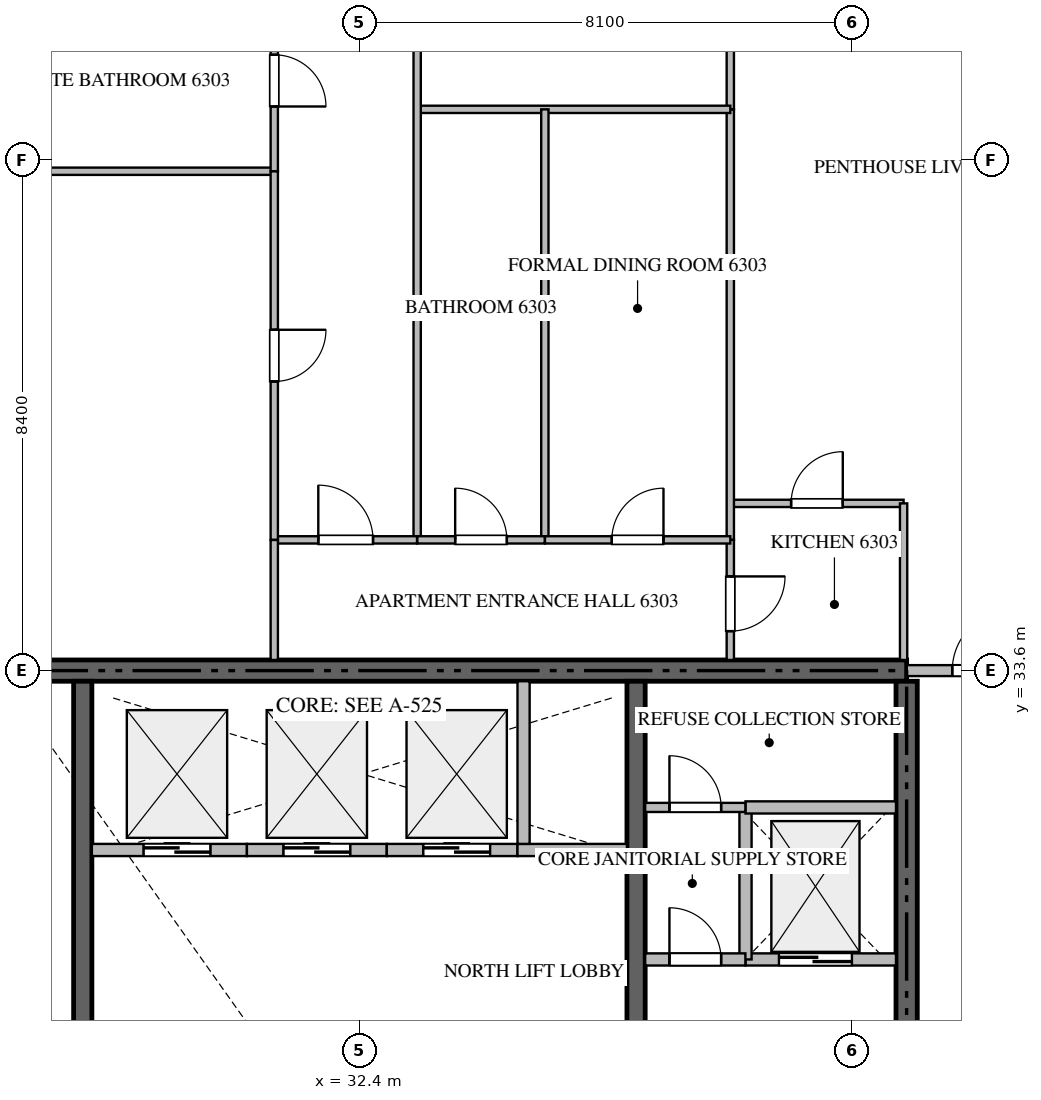
"""IFC4 building model, lengths in metres.
Left out: names, types, materials, properties, quantities, classifications, styles, units other than length and angle.
Written with IfcOpenShell. Run it as: python <this file> out.ifc"""

import sys

from ifc_helpers import new_model, si_unit, direction, frame, frame_2d, origin, place, context, subcontext, project, spatial, rectangle, extrude, source, transform, mapped, element, fill, save


model = new_model("IFC4")
c1 = context("Model", 3, precision=1e-05, world=origin(), true_north=direction((0.0, 1.0)))
c2 = subcontext(c1, "Body", "Model", "MODEL_VIEW")
j1 = project(units=[si_unit("LENGTHUNIT", "METRE"), si_unit("PLANEANGLEUNIT", "RADIAN")], contexts=[c1])
p1 = place(None, origin())
s1 = spatial("IfcSite", under=j1, at=p1, CompositionType="ELEMENT")
p2 = place(p1, origin())
s2 = spatial("IfcBuilding", under=s1, at=p2, CompositionType="ELEMENT")
p3 = place(p2, frame((0.0, 0.0, 252.8)))
s3 = spatial("IfcBuildingStorey", under=s2, at=p3, CompositionType="ELEMENT", Elevation=252.8)
p4 = place(p3, frame((41.4, 33.6, -0.26), z_axis=(0.0, 0.0, 1.0), x_axis=(-1.0, 0.0, 0.0)))
e1 = element("IfcWall", 1, at=p4, inside=s3, PredefinedType="SHEAR", context=c2, shape_type="SweptSolid", body=[
    extrude(rectangle(XDim=18.0, YDim=0.35, at=frame_2d((9.0, 0.0))), origin(), (0.0, 0.0, 1.0), 3.848),
])
p5 = place(p3, frame((41.4, 27.75, -0.26), z_axis=(0.0, 0.0, 1.0), x_axis=(0.0, 1.0, 0.0)))
e2 = element("IfcWall", 2, at=p5, inside=s3, PredefinedType="SHEAR", context=c2, shape_type="SweptSolid", body=[
    extrude(rectangle(XDim=5.675, YDim=0.35, at=frame_2d((2.837, 0.0))), origin(), (0.0, 0.0, 1.0), 3.848),
])
p6 = place(p3, frame((27.85, 23.55, -0.26), z_axis=(0.0, 0.0, 1.0), x_axis=(0.0, 1.0, 0.0)))
e3 = element("IfcWall", 3, at=p6, inside=s3, PredefinedType="SHEAR", context=c2, shape_type="SweptSolid", body=[
    extrude(rectangle(XDim=9.875, YDim=0.3, at=frame_2d((4.938, 0.0))), origin(), (0.0, 0.0, 1.0), 3.848),
])
p7 = place(p3, frame((36.95, 27.05, -0.26), z_axis=(0.0, 0.0, 1.0), x_axis=(0.0, 1.0, 0.0)))
e4 = element("IfcWall", 4, at=p7, inside=s3, PredefinedType="SHEAR", context=c2, shape_type="SweptSolid", body=[
    extrude(rectangle(XDim=6.375, YDim=0.3, at=frame_2d((3.188, 0.0))), origin(), (0.0, 0.0, 1.0), 3.848),
])
p8 = place(p3, frame((38.75, 28.85, 0.0), z_axis=(0.0, 0.0, 1.0), x_axis=(1.0, 0.0, 0.0)))
e5 = element("IfcWall", 5, at=p8, inside=s3, PredefinedType="STANDARD", context=c2, shape_type="SweptSolid", body=[
    extrude(rectangle(XDim=2.475, YDim=0.2, at=frame_2d((1.238, 0.0))), origin(), (0.0, 0.0, 1.0), 3.59),
])
p9 = place(p8, frame((0.55, 0.0, 0.0)))
e6 = element("IfcOpeningElement", 6, at=p9, cuts=e5, PredefinedType="OPENING", context=c2, shape_type="SweptSolid", body=[
    extrude(rectangle(XDim=1.2, YDim=2.2, at=frame_2d((0.6, 1.1))), frame((0.0, 0.11, 0.0), z_axis=(0.0, -1.0, 0.0), x_axis=(1.0, 0.0, 0.0)), (0.0, 0.0, 1.0), 0.22),
])
p10 = place(p3, frame((28.0, 30.65, 0.0), z_axis=(0.0, 0.0, 1.0), x_axis=(1.0, 0.0, 0.0)))
e7 = element("IfcWall", 7, at=p10, inside=s3, PredefinedType="STANDARD", context=c2, shape_type="SweptSolid", body=[
    extrude(rectangle(XDim=2.55, YDim=0.2, at=frame_2d((1.275, 0.0))), origin(), (0.0, 0.0, 1.0), 3.59),
])
p11 = place(p10, frame((0.85, 0.0, 0.0)))
e8 = element("IfcOpeningElement", 8, at=p11, cuts=e7, PredefinedType="OPENING", context=c2, shape_type="SweptSolid", body=[
    extrude(rectangle(XDim=1.1, YDim=2.2, at=frame_2d((0.55, 1.1))), frame((0.0, 0.11, 0.0), z_axis=(0.0, -1.0, 0.0), x_axis=(1.0, 0.0, 0.0)), (0.0, 0.0, 1.0), 0.22),
])
p12 = place(p3, frame((30.55, 30.65, 0.0), z_axis=(0.0, 0.0, 1.0), x_axis=(1.0, 0.0, 0.0)))
e9 = element("IfcWall", 9, at=p12, inside=s3, PredefinedType="STANDARD", context=c2, shape_type="SweptSolid", body=[
    extrude(rectangle(XDim=2.3, YDim=0.2, at=frame_2d((1.15, 0.0))), origin(), (0.0, 0.0, 1.0), 3.59),
])
p13 = place(p12, frame((0.6, 0.0, 0.0)))
e10 = element("IfcOpeningElement", 10, at=p13, cuts=e9, PredefinedType="OPENING", context=c2, shape_type="SweptSolid", body=[
    extrude(rectangle(XDim=1.1, YDim=2.2, at=frame_2d((0.55, 1.1))), frame((0.0, 0.11, 0.0), z_axis=(0.0, -1.0, 0.0), x_axis=(1.0, 0.0, 0.0)), (0.0, 0.0, 1.0), 0.22),
])
p14 = place(p3, frame((32.85, 30.65, 0.0), z_axis=(0.0, 0.0, 1.0), x_axis=(1.0, 0.0, 0.0)))
e11 = element("IfcWall", 11, at=p14, inside=s3, PredefinedType="STANDARD", context=c2, shape_type="SweptSolid", body=[
    extrude(rectangle(XDim=2.15, YDim=0.2, at=frame_2d((1.075, 0.0))), origin(), (0.0, 0.0, 1.0), 3.59),
])
p15 = place(p14, frame((0.6, 0.0, 0.0)))
e12 = element("IfcOpeningElement", 12, at=p15, cuts=e11, PredefinedType="OPENING", context=c2, shape_type="SweptSolid", body=[
    extrude(rectangle(XDim=1.1, YDim=2.2, at=frame_2d((0.55, 1.1))), frame((0.0, 0.11, 0.0), z_axis=(0.0, -1.0, 0.0), x_axis=(1.0, 0.0, 0.0)), (0.0, 0.0, 1.0), 0.22),
])
p16 = place(p3, frame((35.0, 30.65, 0.0), z_axis=(0.0, 0.0, 1.0), x_axis=(1.0, 0.0, 0.0)))
e13 = element("IfcWall", 13, at=p16, inside=s3, PredefinedType="STANDARD", context=c2, shape_type="SweptSolid", body=[
    extrude(rectangle(XDim=1.8, YDim=0.2, at=frame_2d((0.9, 0.0))), origin(), (0.0, 0.0, 1.0), 3.59),
])
p17 = place(p3, frame((35.1, 30.75, 0.0), z_axis=(0.0, 0.0, 1.0), x_axis=(0.0, 1.0, 0.0)))
e14 = element("IfcWall", 14, at=p17, inside=s3, PredefinedType="STANDARD", context=c2, shape_type="SweptSolid", body=[
    extrude(rectangle(XDim=2.675, YDim=0.2, at=frame_2d((1.337, 0.0))), origin(), (0.0, 0.0, 1.0), 3.59),
])
p18 = place(p3, frame((38.75, 28.85, 0.0), z_axis=(0.0, 0.0, 1.0), x_axis=(0.0, 1.0, 0.0)))
e15 = element("IfcWall", 15, at=p18, inside=s3, PredefinedType="STANDARD", context=c2, shape_type="SweptSolid", body=[
    extrude(rectangle(XDim=2.5, YDim=0.2, at=frame_2d((1.25, 0.0))), origin(), (0.0, 0.0, 1.0), 3.59),
])
p19 = place(p3, frame((38.75, 31.35, 0.0), z_axis=(0.0, 0.0, 1.0), x_axis=(1.0, 0.0, 0.0)))
e16 = element("IfcWall", 16, at=p19, inside=s3, PredefinedType="STANDARD", context=c2, shape_type="SweptSolid", body=[
    extrude(rectangle(XDim=2.475, YDim=0.2, at=frame_2d((1.238, 0.0))), origin(), (0.0, 0.0, 1.0), 3.59),
])
p20 = place(p3, frame((37.1, 28.85, 0.0), z_axis=(0.0, 0.0, 1.0), x_axis=(1.0, 0.0, 0.0)))
e17 = element("IfcWall", 17, at=p20, inside=s3, PredefinedType="STANDARD", context=c2, shape_type="SweptSolid", body=[
    extrude(rectangle(XDim=1.648, YDim=0.2, at=frame_2d((0.824, 0.0))), origin(), (0.0, 0.0, 1.0), 3.59),
])
p21 = place(p20, frame((0.399, 0.0, 0.0)))
e18 = element("IfcOpeningElement", 18, at=p21, cuts=e17, PredefinedType="OPENING", context=c2, shape_type="SweptSolid", body=[
    extrude(rectangle(XDim=0.85, YDim=2.1, at=frame_2d((0.425, 1.05))), frame((0.0, 0.11, 0.0), z_axis=(0.0, -1.0, 0.0), x_axis=(1.0, 0.0, 0.0)), (0.0, 0.0, 1.0), 0.22),
])
p22 = place(p3, frame((37.1, 31.35, 0.0), z_axis=(0.0, 0.0, 1.0), x_axis=(1.0, 0.0, 0.0)))
e19 = element("IfcWall", 19, at=p22, inside=s3, PredefinedType="PARTITIONING", context=c2, shape_type="SweptSolid", body=[
    extrude(rectangle(XDim=1.648, YDim=0.15, at=frame_2d((0.824, 0.0))), origin(), (0.0, 0.0, 1.0), 3.59),
])
p23 = place(p22, frame((0.399, 0.0, 0.0)))
e20 = element("IfcOpeningElement", 20, at=p23, cuts=e19, PredefinedType="OPENING", context=c2, shape_type="SweptSolid", body=[
    extrude(rectangle(XDim=0.85, YDim=2.1, at=frame_2d((0.425, 1.05))), frame((0.0, 0.085, 0.0), z_axis=(0.0, -1.0, 0.0), x_axis=(1.0, 0.0, 0.0)), (0.0, 0.0, 1.0), 0.17),
])
p24 = place(p3, frame((41.402, 33.6, 0.0), z_axis=(0.0, 0.0, 1.0), x_axis=(1.0, 0.0, 0.0)))
e21 = element("IfcWall", 21, at=p24, inside=s3, PredefinedType="PARTITIONING", context=c2, shape_type="SweptSolid", body=[
    extrude(rectangle(XDim=2.496, YDim=0.18, at=frame_2d((1.248, 0.0))), origin(), (0.0, 0.0, 1.0), 3.59),
])
p25 = place(p24, frame((0.748, 0.0, 0.0)))
e22 = element("IfcOpeningElement", 22, at=p25, cuts=e21, PredefinedType="OPENING", context=c2, shape_type="SweptSolid", body=[
    extrude(rectangle(XDim=1.0, YDim=2.15, at=frame_2d((0.5, 1.075))), frame((0.0, 0.1, 0.0), z_axis=(0.0, -1.0, 0.0), x_axis=(1.0, 0.0, 0.0)), (0.0, 0.0, 1.0), 0.2),
])
p26 = place(p3, frame((38.5, 36.35, 0.0), z_axis=(0.0, 0.0, 1.0), x_axis=(1.0, 0.0, 0.0)))
e23 = element("IfcWall", 23, at=p26, inside=s3, PredefinedType="PARTITIONING", context=c2, shape_type="SweptSolid", body=[
    extrude(rectangle(XDim=2.85, YDim=0.12, at=frame_2d((1.425, 0.0))), origin(), (0.0, 0.0, 1.0), 3.59),
])
p27 = place(p26, frame((1.0, 0.0, 0.0)))
e24 = element("IfcOpeningElement", 24, at=p27, cuts=e23, PredefinedType="OPENING", context=c2, shape_type="SweptSolid", body=[
    extrude(rectangle(XDim=0.85, YDim=2.1, at=frame_2d((0.425, 1.05))), frame((0.0, 0.07, 0.0), z_axis=(0.0, -1.0, 0.0), x_axis=(1.0, 0.0, 0.0)), (0.0, 0.0, 1.0), 0.14),
])
p28 = place(p3, frame((41.35, 36.35, 0.0), z_axis=(0.0, 0.0, 1.0), x_axis=(0.0, -1.0, 0.0)))
e25 = element("IfcWall", 25, at=p28, inside=s3, PredefinedType="PARTITIONING", context=c2, shape_type="SweptSolid", body=[
    extrude(rectangle(XDim=2.575, YDim=0.12, at=frame_2d((1.288, 0.0))), origin(), (0.0, 0.0, 1.0), 3.59),
])
p29 = place(p3, frame((38.5, 35.75, 0.0), z_axis=(0.0, 0.0, 1.0), x_axis=(0.0, -1.0, 0.0)))
e26 = element("IfcWall", 26, at=p29, inside=s3, PredefinedType="PARTITIONING", context=c2, shape_type="SweptSolid", body=[
    extrude(rectangle(XDim=1.975, YDim=0.12, at=frame_2d((0.988, 0.0))), origin(), (0.0, 0.0, 1.0), 3.59),
])
p30 = place(p29, frame((0.601, 0.0, 0.0)))
e27 = element("IfcOpeningElement", 27, at=p30, cuts=e26, PredefinedType="OPENING", context=c2, shape_type="SweptSolid", body=[
    extrude(rectangle(XDim=0.9, YDim=2.1, at=frame_2d((0.45, 1.05))), frame((0.0, 0.07, 0.0), z_axis=(0.0, -1.0, 0.0), x_axis=(1.0, 0.0, 0.0)), (0.0, 0.0, 1.0), 0.14),
])
p31 = place(p3, frame((38.5, 49.105, 0.0), z_axis=(0.0, 0.0, 1.0), x_axis=(0.0, -1.0, 0.0)))
e28 = element("IfcWall", 28, at=p31, inside=s3, PredefinedType="PARTITIONING", context=c2, shape_type="SweptSolid", body=[
    extrude(rectangle(XDim=6.275, YDim=0.12, at=frame_2d((3.137, 0.0))), origin(), (0.0, 0.0, 1.0), 3.59),
])
p32 = place(p31, frame((2.956, 0.0, 0.0)))
e29 = element("IfcOpeningElement", 29, at=p32, cuts=e28, PredefinedType="OPENING", context=c2, shape_type="SweptSolid", body=[
    extrude(rectangle(XDim=0.9, YDim=2.1, at=frame_2d((0.45, 1.05))), frame((0.0, 0.07, 0.0), z_axis=(0.0, -1.0, 0.0), x_axis=(1.0, 0.0, 0.0)), (0.0, 0.0, 1.0), 0.14),
])
p33 = place(p3, frame((38.5, 42.828, 0.0), z_axis=(0.0, 0.0, 1.0), x_axis=(0.0, -1.0, 0.0)))
e30 = element("IfcWall", 30, at=p33, inside=s3, PredefinedType="PARTITIONING", context=c2, shape_type="SweptSolid", body=[
    extrude(rectangle(XDim=7.076, YDim=0.12, at=frame_2d((3.538, 0.0))), origin(), (0.0, 0.0, 1.0), 3.59),
])
p34 = place(p3, frame((33.35, 42.83, 0.0), z_axis=(0.0, 0.0, 1.0), x_axis=(1.0, 0.0, 0.0)))
e31 = element("IfcWall", 31, at=p34, inside=s3, PredefinedType="PARTITIONING", context=c2, shape_type="SweptSolid", body=[
    extrude(rectangle(XDim=5.15, YDim=0.12, at=frame_2d((2.575, 0.0))), origin(), (0.0, 0.0, 1.0), 3.59),
])
p35 = place(p3, frame((33.35, 49.105, 0.0), z_axis=(0.0, 0.0, 1.0), x_axis=(0.0, -1.0, 0.0)))
e32 = element("IfcWall", 32, at=p35, inside=s3, PredefinedType="PARTITIONING", context=c2, shape_type="SweptSolid", body=[
    extrude(rectangle(XDim=13.355, YDim=0.12, at=frame_2d((6.677, 0.0))), origin(), (0.0, 0.0, 1.0), 3.59),
])
p36 = place(p3, frame((35.45, 42.83, 0.0), z_axis=(0.0, 0.0, 1.0), x_axis=(0.0, -1.0, 0.0)))
e33 = element("IfcWall", 33, at=p36, inside=s3, PredefinedType="PARTITIONING", context=c2, shape_type="SweptSolid", body=[
    extrude(rectangle(XDim=7.08, YDim=0.12, at=frame_2d((3.54, 0.0))), origin(), (0.0, 0.0, 1.0), 3.59),
])
p37 = place(p3, frame((33.35, 35.75, 0.0), z_axis=(0.0, 0.0, 1.0), x_axis=(1.0, 0.0, 0.0)))
e34 = element("IfcWall", 34, at=p37, inside=s3, PredefinedType="PARTITIONING", context=c2, shape_type="SweptSolid", body=[
    extrude(rectangle(XDim=2.1, YDim=0.12, at=frame_2d((1.05, 0.0))), origin(), (0.0, 0.0, 1.0), 3.59),
])
p38 = place(p37, frame((0.625, 0.0, 0.0)))
e35 = element("IfcOpeningElement", 35, at=p38, cuts=e34, PredefinedType="OPENING", context=c2, shape_type="SweptSolid", body=[
    extrude(rectangle(XDim=0.85, YDim=2.1, at=frame_2d((0.425, 1.05))), frame((0.0, 0.07, 0.0), z_axis=(0.0, -1.0, 0.0), x_axis=(1.0, 0.0, 0.0)), (0.0, 0.0, 1.0), 0.14),
])
p39 = place(p3, frame((35.452, 35.75, 0.0), z_axis=(0.0, 0.0, 1.0), x_axis=(1.0, 0.0, 0.0)))
e36 = element("IfcWall", 36, at=p39, inside=s3, PredefinedType="PARTITIONING", context=c2, shape_type="SweptSolid", body=[
    extrude(rectangle(XDim=3.048, YDim=0.12, at=frame_2d((1.524, 0.0))), origin(), (0.0, 0.0, 1.0), 3.59),
])
p40 = place(p39, frame((1.099, 0.0, 0.0)))
e37 = element("IfcOpeningElement", 37, at=p40, cuts=e36, PredefinedType="OPENING", context=c2, shape_type="SweptSolid", body=[
    extrude(rectangle(XDim=0.85, YDim=2.1, at=frame_2d((0.425, 1.05))), frame((0.0, 0.07, 0.0), z_axis=(0.0, -1.0, 0.0), x_axis=(1.0, 0.0, 0.0)), (0.0, 0.0, 1.0), 0.14),
])
p41 = place(p3, frame((31.0, 35.75, 0.0), z_axis=(0.0, 0.0, 1.0), x_axis=(1.0, 0.0, 0.0)))
e38 = element("IfcWall", 38, at=p41, inside=s3, PredefinedType="PARTITIONING", context=c2, shape_type="SweptSolid", body=[
    extrude(rectangle(XDim=2.348, YDim=0.12, at=frame_2d((1.174, 0.0))), origin(), (0.0, 0.0, 1.0), 3.59),
])
p42 = place(p41, frame((0.724, 0.0, 0.0)))
e39 = element("IfcOpeningElement", 39, at=p42, cuts=e38, PredefinedType="OPENING", context=c2, shape_type="SweptSolid", body=[
    extrude(rectangle(XDim=0.9, YDim=2.1, at=frame_2d((0.45, 1.05))), frame((0.0, 0.07, 0.0), z_axis=(0.0, -1.0, 0.0), x_axis=(1.0, 0.0, 0.0)), (0.0, 0.0, 1.0), 0.14),
])
p43 = place(p3, frame((26.3, 41.812, 0.0), z_axis=(0.0, 0.0, 1.0), x_axis=(1.0, 0.0, 0.0)))
e40 = element("IfcWall", 40, at=p43, inside=s3, PredefinedType="PARTITIONING", context=c2, shape_type="SweptSolid", body=[
    extrude(rectangle(XDim=4.7, YDim=0.12, at=frame_2d((2.35, 0.0))), origin(), (0.0, 0.0, 1.0), 3.59),
])
p44 = place(p3, frame((31.0, 44.791, 0.0), z_axis=(0.0, 0.0, 1.0), x_axis=(0.0, -1.0, 0.0)))
e41 = element("IfcWall", 41, at=p44, inside=s3, PredefinedType="PARTITIONING", context=c2, shape_type="SweptSolid", body=[
    extrude(rectangle(XDim=2.979, YDim=0.12, at=frame_2d((1.49, 0.0))), origin(), (0.0, 0.0, 1.0), 3.59),
])
p45 = place(p44, frame((1.064, 0.0, 0.0)))
e42 = element("IfcOpeningElement", 42, at=p45, cuts=e41, PredefinedType="OPENING", context=c2, shape_type="SweptSolid", body=[
    extrude(rectangle(XDim=0.85, YDim=2.1, at=frame_2d((0.425, 1.05))), frame((0.0, 0.07, 0.0), z_axis=(0.0, -1.0, 0.0), x_axis=(1.0, 0.0, 0.0)), (0.0, 0.0, 1.0), 0.14),
])
p46 = place(p3, frame((31.0, 41.81, 0.0), z_axis=(0.0, 0.0, 1.0), x_axis=(0.0, -1.0, 0.0)))
e43 = element("IfcWall", 43, at=p46, inside=s3, PredefinedType="PARTITIONING", context=c2, shape_type="SweptSolid", body=[
    extrude(rectangle(XDim=6.06, YDim=0.12, at=frame_2d((3.03, 0.0))), origin(), (0.0, 0.0, 1.0), 3.59),
])
p47 = place(p46, frame((2.605, 0.0, 0.0)))
e44 = element("IfcOpeningElement", 44, at=p47, cuts=e43, PredefinedType="OPENING", context=c2, shape_type="SweptSolid", body=[
    extrude(rectangle(XDim=0.85, YDim=2.1, at=frame_2d((0.425, 1.05))), frame((0.0, 0.07, 0.0), z_axis=(0.0, -1.0, 0.0), x_axis=(1.0, 0.0, 0.0)), (0.0, 0.0, 1.0), 0.14),
])
p48 = place(p3, frame((31.0, 35.748, 0.0), z_axis=(0.0, 0.0, 1.0), x_axis=(0.0, -1.0, 0.0)))
e45 = element("IfcWall", 45, at=p48, inside=s3, PredefinedType="PARTITIONING", context=c2, shape_type="SweptSolid", body=[
    extrude(rectangle(XDim=1.973, YDim=0.12, at=frame_2d((0.987, 0.0))), origin(), (0.0, 0.0, 1.0), 3.59),
])
m1 = source(origin(), c2, "Body", "SweptSolid", [
    extrude(rectangle(XDim=1.2, YDim=2.2, at=frame_2d((0.6, 1.1))), frame((0.0, 0.025, 0.0), z_axis=(0.0, -1.0, 0.0), x_axis=(1.0, 0.0, 0.0)), (0.0, 0.0, 1.0), 0.05),
])
p49 = place(p9, origin())
e46 = element("IfcDoor", 46, at=p49, inside=s3, OperationType="DOUBLE_DOOR_SLIDING", PredefinedType="DOOR", context=c2, shape_type="MappedRepresentation", body=[
    mapped(m1, transform((0.0, 0.0, 0.0), scale=1.0)),
])
fill(e6, e46)
m2 = source(origin(), c2, "Body", "SweptSolid", [
    extrude(rectangle(XDim=1.1, YDim=2.2, at=frame_2d((0.55, 1.1))), frame((0.0, 0.025, 0.0), z_axis=(0.0, -1.0, 0.0), x_axis=(1.0, 0.0, 0.0)), (0.0, 0.0, 1.0), 0.05),
])
p50 = place(p11, origin())
e47 = element("IfcDoor", 47, at=p50, inside=s3, OperationType="DOUBLE_DOOR_SLIDING", PredefinedType="DOOR", context=c2, shape_type="MappedRepresentation", body=[
    mapped(m2, transform((0.0, 0.0, 0.0), scale=1.0)),
])
fill(e8, e47)
p51 = place(p13, origin())
e48 = element("IfcDoor", 48, at=p51, inside=s3, OperationType="DOUBLE_DOOR_SLIDING", PredefinedType="DOOR", context=c2, shape_type="MappedRepresentation", body=[
    mapped(m2, transform((0.0, 0.0, 0.0), scale=1.0)),
])
fill(e10, e48)
p52 = place(p15, origin())
e49 = element("IfcDoor", 49, at=p52, inside=s3, OperationType="DOUBLE_DOOR_SLIDING", PredefinedType="DOOR", context=c2, shape_type="MappedRepresentation", body=[
    mapped(m2, transform((0.0, 0.0, 0.0), scale=1.0)),
])
fill(e12, e49)
m3 = source(origin(), c2, "Body", "SweptSolid", [
    extrude(rectangle(XDim=0.85, YDim=2.1, at=frame_2d((0.425, 1.05))), frame((0.0, 0.025, 0.0), z_axis=(0.0, -1.0, 0.0), x_axis=(1.0, 0.0, 0.0)), (0.0, 0.0, 1.0), 0.05),
])
p53 = place(p21, origin())
e50 = element("IfcDoor", 50, at=p53, inside=s3, OperationType="SINGLE_SWING_LEFT", PredefinedType="DOOR", context=c2, shape_type="MappedRepresentation", body=[
    mapped(m3, transform((0.0, 0.0, 0.0), scale=1.0)),
])
fill(e18, e50)
p54 = place(p23, origin())
e51 = element("IfcDoor", 51, at=p54, inside=s3, OperationType="SINGLE_SWING_LEFT", PredefinedType="DOOR", context=c2, shape_type="MappedRepresentation", body=[
    mapped(m3, transform((0.0, 0.0, 0.0), scale=1.0)),
])
fill(e20, e51)
m4 = source(origin(), c2, "Body", "SweptSolid", [
    extrude(rectangle(XDim=1.0, YDim=2.15, at=frame_2d((0.5, 1.075))), frame((0.0, 0.025, 0.0), z_axis=(0.0, -1.0, 0.0), x_axis=(1.0, 0.0, 0.0)), (0.0, 0.0, 1.0), 0.05),
])
p55 = place(p25, origin())
e52 = element("IfcDoor", 52, at=p55, inside=s3, OperationType="SINGLE_SWING_RIGHT", PredefinedType="DOOR", context=c2, shape_type="MappedRepresentation", body=[
    mapped(m4, transform((0.0, 0.0, 0.0), scale=1.0)),
])
fill(e22, e52)
p56 = place(p27, origin())
e53 = element("IfcDoor", 53, at=p56, inside=s3, OperationType="SINGLE_SWING_RIGHT", PredefinedType="DOOR", context=c2, shape_type="MappedRepresentation", body=[
    mapped(m3, transform((0.0, 0.0, 0.0), scale=1.0)),
])
fill(e24, e53)
m5 = source(origin(), c2, "Body", "SweptSolid", [
    extrude(rectangle(XDim=0.9, YDim=2.1, at=frame_2d((0.45, 1.05))), frame((0.0, 0.025, 0.0), z_axis=(0.0, -1.0, 0.0), x_axis=(1.0, 0.0, 0.0)), (0.0, 0.0, 1.0), 0.05),
])
p57 = place(p30, origin())
e54 = element("IfcDoor", 54, at=p57, inside=s3, OperationType="SINGLE_SWING_LEFT", PredefinedType="DOOR", context=c2, shape_type="MappedRepresentation", body=[
    mapped(m5, transform((0.0, 0.0, 0.0), scale=1.0)),
])
fill(e27, e54)
p58 = place(p38, origin())
e55 = element("IfcDoor", 55, at=p58, inside=s3, OperationType="SINGLE_SWING_LEFT", PredefinedType="DOOR", context=c2, shape_type="MappedRepresentation", body=[
    mapped(m3, transform((0.0, 0.0, 0.0), scale=1.0)),
])
fill(e35, e55)
p59 = place(p40, origin())
e56 = element("IfcDoor", 56, at=p59, inside=s3, OperationType="SINGLE_SWING_RIGHT", PredefinedType="DOOR", context=c2, shape_type="MappedRepresentation", body=[
    mapped(m3, transform((0.0, 0.0, 0.0), scale=1.0)),
])
fill(e37, e56)
p60 = place(p42, origin())
e57 = element("IfcDoor", 57, at=p60, inside=s3, OperationType="SINGLE_SWING_LEFT", PredefinedType="DOOR", context=c2, shape_type="MappedRepresentation", body=[
    mapped(m5, transform((0.0, 0.0, 0.0), scale=1.0)),
])
fill(e39, e57)
p61 = place(p45, origin())
e58 = element("IfcDoor", 58, at=p61, inside=s3, OperationType="SINGLE_SWING_RIGHT", PredefinedType="DOOR", context=c2, shape_type="MappedRepresentation", body=[
    mapped(m3, transform((0.0, 0.0, 0.0), scale=1.0)),
])
fill(e42, e58)
p62 = place(p47, origin())
e59 = element("IfcDoor", 59, at=p62, inside=s3, OperationType="SINGLE_SWING_LEFT", PredefinedType="DOOR", context=c2, shape_type="MappedRepresentation", body=[
    mapped(m3, transform((0.0, 0.0, 0.0), scale=1.0)),
])
fill(e44, e59)
save(model, sys.argv[1])
